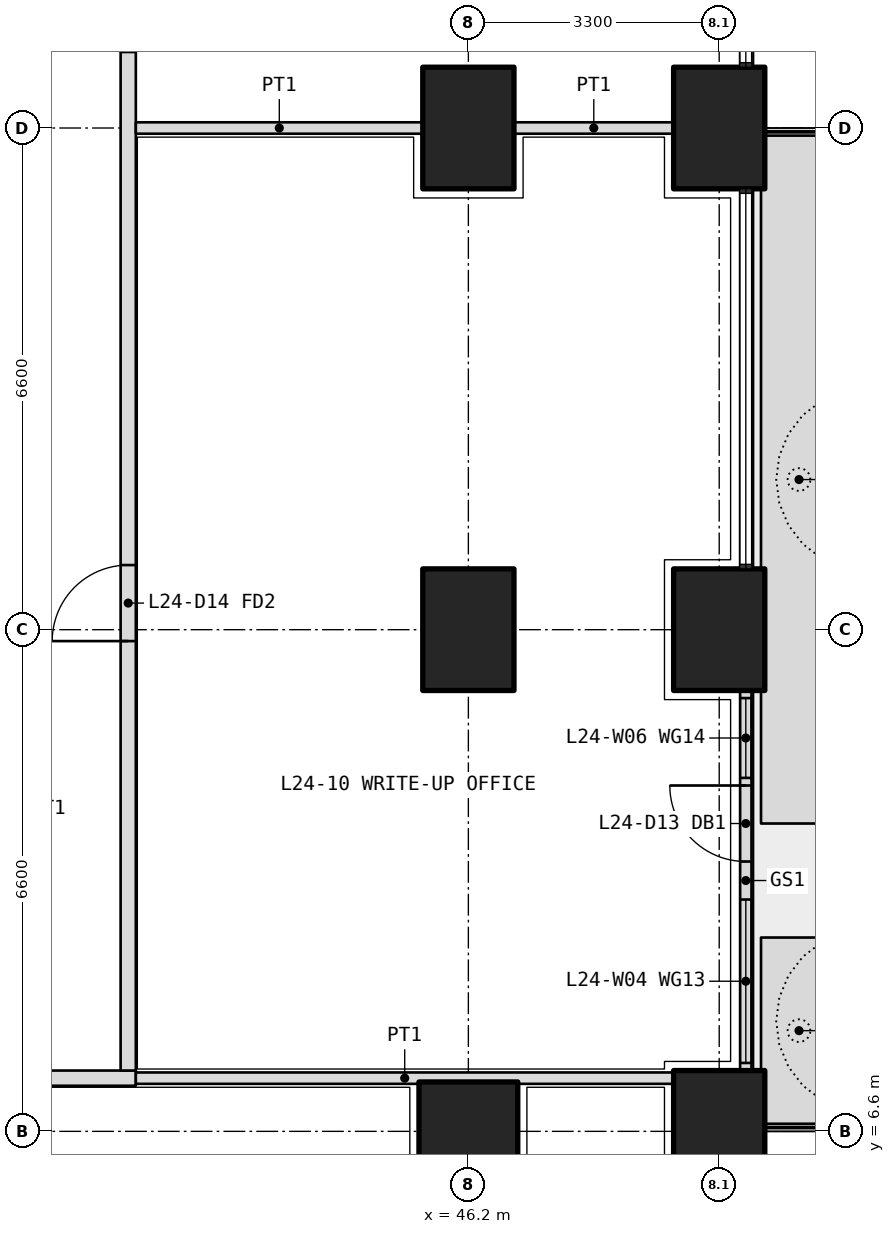
"""IFC4 building model, lengths in metres.
Left out: names, types, materials, properties, quantities, classifications, styles, units other than length and angle.
Written with IfcOpenShell. Run it as: python <this file> out.ifc"""

import sys

from ifc_helpers import new_model, si_unit, direction, frame, frame_2d, origin, origin_2d, place, context, subcontext, project, spatial, polyline, rectangle, outline, extrude, element, fill, save


model = new_model("IFC4")
c1 = context("Model", 3, precision=1e-05, world=origin(), true_north=direction((0.0, 1.0)))
c2 = subcontext(c1, "Body", "Model", "MODEL_VIEW")
j1 = project(units=[si_unit("LENGTHUNIT", "METRE"), si_unit("PLANEANGLEUNIT", "RADIAN")], contexts=[c1])
p1 = place(None, origin())
s1 = spatial("IfcSite", under=j1, at=p1, CompositionType="ELEMENT")
p2 = place(p1, origin())
s2 = spatial("IfcBuilding", under=s1, at=p2, CompositionType="ELEMENT")
p3 = place(p2, frame((0.0, 0.0, 107.4)))
s3 = spatial("IfcBuildingStorey", under=s2, at=p3, CompositionType="ELEMENT", Elevation=107.4)
for number, where, z_axis, x_axis in (
    (1, (49.5, 6.6, 0.0), (0.0, 0.0, 1.0), (0.0, 1.0, 0.0)),
    (2, (49.5, 13.2, 0.0), (0.0, 0.0, 1.0), (0.0, 1.0, 0.0)),
    (3, (49.5, 19.8, 0.0), (0.0, 0.0, 1.0), (0.0, 1.0, 0.0)),
):
    element("IfcColumn", number, at=place(p3, frame(where, z_axis=z_axis, x_axis=x_axis)), inside=s3, PredefinedType="COLUMN", context=c2, shape_type="SweptSolid", body=[
        extrude(rectangle(XDim=1.6, YDim=1.2, at=origin_2d()), origin(), (0.0, 0.0, 1.0), 4.2),
    ])
p4 = place(p3, frame((46.2, 6.6, 0.0), z_axis=(0.0, 0.0, 1.0), x_axis=(1.0, 0.0, 0.0)))
e4 = element("IfcColumn", 4, at=p4, inside=s3, PredefinedType="COLUMN", context=c2, shape_type="SweptSolid", body=[
    extrude(rectangle(XDim=1.3, YDim=1.3, at=origin_2d()), origin(), (0.0, 0.0, 1.0), 4.2),
])
for number, where, z_axis, x_axis in (
    (5, (46.2, 13.2, 0.0), (0.0, 0.0, 1.0), (0.0, 1.0, 0.0)),
    (6, (46.2, 19.8, 0.0), (0.0, 0.0, 1.0), (0.0, 1.0, 0.0)),
):
    element("IfcColumn", number, at=place(p3, frame(where, z_axis=z_axis, x_axis=x_axis)), inside=s3, PredefinedType="COLUMN", context=c2, shape_type="SweptSolid", body=[
        extrude(rectangle(XDim=1.6, YDim=1.2, at=origin_2d()), origin(), (0.0, 0.0, 1.0), 4.2),
    ])
p5 = place(p3, origin())
e7 = element("IfcWall", 7, at=p5, inside=s3, PredefinedType="USERDEFINED", context=c2, shape_type="SweptSolid", body=[
    extrude(outline(polyline([(50.05, 6.7), (51.05, 6.7), (51.05, 9.15), (50.05, 9.15), (50.05, 6.7)]), holes=[polyline([(50.2, 6.85), (50.9, 6.85), (50.9, 9.0), (50.2, 9.0), (50.2, 6.85)])]), origin(), (0.0, 0.0, 1.0), 1.05),
])
p6 = place(p3, origin())
e8 = element("IfcWall", 8, at=p6, inside=s3, PredefinedType="USERDEFINED", context=c2, shape_type="SweptSolid", body=[
    extrude(outline(polyline([(50.05, 10.65), (51.05, 10.65), (51.05, 19.7), (50.05, 19.7), (50.05, 10.65)]), holes=[polyline([(50.2, 10.8), (50.9, 10.8), (50.9, 19.55), (50.2, 19.55), (50.2, 10.8)])]), origin(), (0.0, 0.0, 1.0), 1.05),
])
p7 = place(p3, frame((49.85, 7.4, 0.0), z_axis=(0.0, 0.0, 1.0), x_axis=(0.0, 1.0, 0.0)))
e9 = element("IfcWall", 9, at=p7, inside=s3, PredefinedType="SOLIDWALL", context=c2, shape_type="SweptSolid", body=[
    extrude(rectangle(XDim=5.0, YDim=0.15, at=frame_2d((2.5, 0.0))), origin(), (0.0, 0.0, 1.0), 2.7),
])
p8 = place(p7, frame((2.75, 0.0, 0.0)))
e10 = element("IfcOpeningElement", 10, at=p8, cuts=e9, PredefinedType="OPENING", context=c2, shape_type="SweptSolid", body=[
    extrude(rectangle(XDim=1.0, YDim=2.4, at=frame_2d((0.5, 1.2))), frame((0.0, 0.085, 0.0), z_axis=(0.0, -1.0, 0.0), x_axis=(1.0, 0.0, 0.0)), (0.0, 0.0, 1.0), 0.17),
])
p9 = place(p7, frame((0.1, 0.0, 0.1)))
e11 = element("IfcOpeningElement", 11, at=p9, cuts=e9, PredefinedType="OPENING", context=c2, shape_type="SweptSolid", body=[
    extrude(rectangle(XDim=2.15, YDim=2.3, at=frame_2d((1.075, 1.15))), frame((0.0, 0.085, 0.0), z_axis=(0.0, -1.0, 0.0), x_axis=(1.0, 0.0, 0.0)), (0.0, 0.0, 1.0), 0.17),
])
p10 = place(p7, frame((3.85, 0.0, 0.1)))
e12 = element("IfcOpeningElement", 12, at=p10, cuts=e9, PredefinedType="OPENING", context=c2, shape_type="SweptSolid", body=[
    extrude(rectangle(XDim=1.05, YDim=2.3, at=frame_2d((0.525, 1.15))), frame((0.0, 0.085, 0.0), z_axis=(0.0, -1.0, 0.0), x_axis=(1.0, 0.0, 0.0)), (0.0, 0.0, 1.0), 0.17),
])
p11 = place(p3, frame((10.975, 7.3, 0.0), z_axis=(0.0, 0.0, 1.0), x_axis=(1.0, 0.0, 0.0)))
e13 = element("IfcWall", 13, at=p11, inside=s3, PredefinedType="PARTITIONING", context=c2, shape_type="SweptSolid", body=[
    extrude(rectangle(XDim=30.85, YDim=0.2, at=frame_2d((15.425, 0.0))), origin(), (0.0, 0.0, 1.0), 2.85),
])
p12 = place(p11, frame((0.562, 0.0, 0.0)))
e14 = element("IfcOpeningElement", 14, at=p12, cuts=e13, PredefinedType="OPENING", context=c2, shape_type="SweptSolid", body=[
    extrude(rectangle(XDim=1.2, YDim=2.1, at=frame_2d((0.6, 1.05))), frame((0.0, 0.11, 0.0), z_axis=(0.0, -1.0, 0.0), x_axis=(1.0, 0.0, 0.0)), (0.0, 0.0, 1.0), 0.22),
])
p13 = place(p11, frame((8.325, 0.0, 0.0)))
e15 = element("IfcOpeningElement", 15, at=p13, cuts=e13, PredefinedType="OPENING", context=c2, shape_type="SweptSolid", body=[
    extrude(rectangle(XDim=1.0, YDim=2.1, at=frame_2d((0.5, 1.05))), frame((0.0, 0.11, 0.0), z_axis=(0.0, -1.0, 0.0), x_axis=(1.0, 0.0, 0.0)), (0.0, 0.0, 1.0), 0.22),
])
p14 = place(p11, frame((16.475, 0.0, 0.0)))
e16 = element("IfcOpeningElement", 16, at=p14, cuts=e13, PredefinedType="OPENING", context=c2, shape_type="SweptSolid", body=[
    extrude(rectangle(XDim=1.2, YDim=2.1, at=frame_2d((0.6, 1.05))), frame((0.0, 0.11, 0.0), z_axis=(0.0, -1.0, 0.0), x_axis=(1.0, 0.0, 0.0)), (0.0, 0.0, 1.0), 0.22),
])
p15 = place(p11, frame((21.525, 0.0, 0.0)))
e17 = element("IfcOpeningElement", 17, at=p15, cuts=e13, PredefinedType="OPENING", context=c2, shape_type="SweptSolid", body=[
    extrude(rectangle(XDim=1.0, YDim=2.1, at=frame_2d((0.5, 1.05))), frame((0.0, 0.11, 0.0), z_axis=(0.0, -1.0, 0.0), x_axis=(1.0, 0.0, 0.0)), (0.0, 0.0, 1.0), 0.22),
])
p16 = place(p11, frame((27.538, 0.0, 0.0)))
e18 = element("IfcOpeningElement", 18, at=p16, cuts=e13, PredefinedType="OPENING", context=c2, shape_type="SweptSolid", body=[
    extrude(rectangle(XDim=1.0, YDim=2.1, at=frame_2d((0.5, 1.05))), frame((0.0, 0.11, 0.0), z_axis=(0.0, -1.0, 0.0), x_axis=(1.0, 0.0, 0.0)), (0.0, 0.0, 1.0), 0.22),
])
p17 = place(p3, frame((41.725, 7.4, 0.0), z_axis=(0.0, 0.0, 1.0), x_axis=(0.0, 1.0, 0.0)))
e19 = element("IfcWall", 19, at=p17, inside=s3, PredefinedType="PARTITIONING", context=c2, shape_type="SweptSolid", body=[
    extrude(rectangle(XDim=27.625, YDim=0.2, at=frame_2d((13.812, 0.0))), origin(), (0.0, 0.0, 1.0), 2.85),
])
p18 = place(p17, frame((5.65, 0.0, 0.0)))
e20 = element("IfcOpeningElement", 20, at=p18, cuts=e19, PredefinedType="OPENING", context=c2, shape_type="SweptSolid", body=[
    extrude(rectangle(XDim=1.0, YDim=2.1, at=frame_2d((0.5, 1.05))), frame((0.0, 0.11, 0.0), z_axis=(0.0, -1.0, 0.0), x_axis=(1.0, 0.0, 0.0)), (0.0, 0.0, 1.0), 0.22),
])
p19 = place(p17, frame((13.4, 0.0, 0.0)))
e21 = element("IfcOpeningElement", 21, at=p19, cuts=e19, PredefinedType="OPENING", context=c2, shape_type="SweptSolid", body=[
    extrude(rectangle(XDim=1.0, YDim=2.1, at=frame_2d((0.5, 1.05))), frame((0.0, 0.11, 0.0), z_axis=(0.0, -1.0, 0.0), x_axis=(1.0, 0.0, 0.0)), (0.0, 0.0, 1.0), 0.22),
])
p20 = place(p17, frame((16.75, 0.0, 0.0)))
e22 = element("IfcOpeningElement", 22, at=p20, cuts=e19, PredefinedType="OPENING", context=c2, shape_type="SweptSolid", body=[
    extrude(rectangle(XDim=0.9, YDim=2.1, at=frame_2d((0.45, 1.05))), frame((0.0, 0.11, 0.0), z_axis=(0.0, -1.0, 0.0), x_axis=(1.0, 0.0, 0.0)), (0.0, 0.0, 1.0), 0.22),
])
p21 = place(p17, frame((20.15, 0.0, 0.0)))
e23 = element("IfcOpeningElement", 23, at=p21, cuts=e19, PredefinedType="OPENING", context=c2, shape_type="SweptSolid", body=[
    extrude(rectangle(XDim=1.0, YDim=2.1, at=frame_2d((0.5, 1.05))), frame((0.0, 0.11, 0.0), z_axis=(0.0, -1.0, 0.0), x_axis=(1.0, 0.0, 0.0)), (0.0, 0.0, 1.0), 0.22),
])
p22 = place(p17, frame((24.512, 0.0, 0.0)))
e24 = element("IfcOpeningElement", 24, at=p22, cuts=e19, PredefinedType="OPENING", context=c2, shape_type="SweptSolid", body=[
    extrude(rectangle(XDim=1.0, YDim=2.1, at=frame_2d((0.5, 1.05))), frame((0.0, 0.11, 0.0), z_axis=(0.0, -1.0, 0.0), x_axis=(1.0, 0.0, 0.0)), (0.0, 0.0, 1.0), 0.22),
])
p23 = place(p3, frame((48.9, 7.3, 0.0), z_axis=(0.0, 0.0, 1.0), x_axis=(-1.0, 0.0, 0.0)))
e25 = element("IfcWall", 25, at=p23, inside=s3, PredefinedType="PARTITIONING", context=c2, shape_type="SweptSolid", body=[
    extrude(rectangle(XDim=7.075, YDim=0.15, at=frame_2d((3.538, 0.0))), origin(), (0.0, 0.0, 1.0), 2.85),
])
p24 = place(p3, frame((48.9, 19.8, 0.0), z_axis=(0.0, 0.0, 1.0), x_axis=(-1.0, 0.0, 0.0)))
e26 = element("IfcWall", 26, at=p24, inside=s3, PredefinedType="PARTITIONING", context=c2, shape_type="SweptSolid", body=[
    extrude(rectangle(XDim=2.1, YDim=0.15, at=frame_2d((1.05, 0.0))), origin(), (0.0, 0.0, 1.0), 2.85),
])
p25 = place(p3, frame((45.6, 19.8, 0.0), z_axis=(0.0, 0.0, 1.0), x_axis=(-1.0, 0.0, 0.0)))
e27 = element("IfcWall", 27, at=p25, inside=s3, PredefinedType="PARTITIONING", context=c2, shape_type="SweptSolid", body=[
    extrude(rectangle(XDim=3.775, YDim=0.15, at=frame_2d((1.888, 0.0))), origin(), (0.0, 0.0, 1.0), 2.85),
])
p26 = place(p8, origin())
e28 = element("IfcDoor", 28, at=p26, inside=s3, OperationType="SINGLE_SWING_RIGHT", PredefinedType="DOOR", context=c2, shape_type="SweptSolid", body=[
    extrude(rectangle(XDim=1.0, YDim=2.4, at=frame_2d((0.5, 1.2))), frame((0.0, 0.025, 0.0), z_axis=(0.0, -1.0, 0.0), x_axis=(1.0, 0.0, 0.0)), (0.0, 0.0, 1.0), 0.05),
])
fill(e10, e28)
p27 = place(p9, origin())
e29 = element("IfcWindow", 29, at=p27, inside=s3, PartitioningType="SINGLE_PANEL", PredefinedType="WINDOW", context=c2, shape_type="SweptSolid", body=[
    extrude(rectangle(XDim=2.15, YDim=2.3, at=frame_2d((1.075, 1.15))), frame((0.0, 0.03, 0.0), z_axis=(0.0, -1.0, 0.0), x_axis=(1.0, 0.0, 0.0)), (0.0, 0.0, 1.0), 0.06),
])
fill(e11, e29)
p28 = place(p10, origin())
e30 = element("IfcWindow", 30, at=p28, inside=s3, PartitioningType="SINGLE_PANEL", PredefinedType="WINDOW", context=c2, shape_type="SweptSolid", body=[
    extrude(rectangle(XDim=1.05, YDim=2.3, at=frame_2d((0.525, 1.15))), frame((0.0, 0.03, 0.0), z_axis=(0.0, -1.0, 0.0), x_axis=(1.0, 0.0, 0.0)), (0.0, 0.0, 1.0), 0.06),
])
fill(e12, e30)
p29 = place(p18, origin())
e31 = element("IfcDoor", 31, at=p29, inside=s3, OperationType="SINGLE_SWING_LEFT", PredefinedType="DOOR", context=c2, shape_type="SweptSolid", body=[
    extrude(rectangle(XDim=1.0, YDim=2.1, at=frame_2d((0.5, 1.05))), frame((0.0, 0.025, 0.0), z_axis=(0.0, -1.0, 0.0), x_axis=(1.0, 0.0, 0.0)), (0.0, 0.0, 1.0), 0.05),
])
fill(e20, e31)
p30 = place(p19, origin())
e32 = element("IfcDoor", 32, at=p30, inside=s3, OperationType="SINGLE_SWING_RIGHT", PredefinedType="DOOR", context=c2, shape_type="SweptSolid", body=[
    extrude(rectangle(XDim=1.0, YDim=2.1, at=frame_2d((0.5, 1.05))), frame((0.0, 0.025, 0.0), z_axis=(0.0, -1.0, 0.0), x_axis=(1.0, 0.0, 0.0)), (0.0, 0.0, 1.0), 0.05),
])
fill(e21, e32)
save(model, sys.argv[1])
